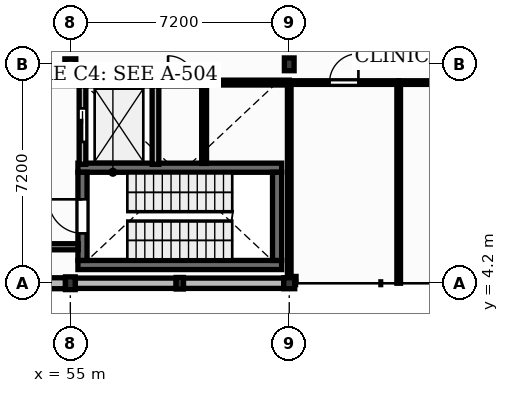
"""IFC4 building model, lengths in metres.
Left out: names, types, materials, properties, quantities, classifications, styles, units other than length and angle.
Written with IfcOpenShell. Run it as: python <this file> out.ifc"""

import sys

from ifc_helpers import new_model, si_unit, direction, frame, frame_2d, origin, origin_2d, place, context, subcontext, project, spatial, rectangle, extrude, element, fill, save


model = new_model("IFC4")
c1 = context("Model", 3, precision=1e-05, world=origin(), true_north=direction((0.0, 1.0)))
c2 = subcontext(c1, "Body", "Model", "MODEL_VIEW")
j1 = project(units=[si_unit("LENGTHUNIT", "METRE"), si_unit("PLANEANGLEUNIT", "RADIAN")], contexts=[c1])
p1 = place(None, origin())
s1 = spatial("IfcSite", under=j1, at=p1, CompositionType="ELEMENT")
p2 = place(p1, origin())
s2 = spatial("IfcBuilding", under=s1, at=p2, CompositionType="ELEMENT")
p3 = place(p2, frame((0.0, 0.0, 4.5)))
s3 = spatial("IfcBuildingStorey", under=s2, at=p3, CompositionType="ELEMENT", Elevation=4.5)
p4 = place(p3, frame((55.0, 4.2, 0.0), z_axis=(0.0, 0.0, 1.0), x_axis=(1.0, 0.0, 0.0)))
e1 = element("IfcColumn", 1, at=p4, inside=s3, PredefinedType="COLUMN", context=c2, shape_type="SweptSolid", body=[
    extrude(rectangle(XDim=0.32, YDim=0.42, at=origin_2d()), origin(), (0.0, 0.0, 1.0), 4.26),
])
for number, where, z_axis, x_axis in (
    (2, (55.0, 11.4, 0.0), (0.0, 0.0, 1.0), (1.0, 0.0, 0.0)),
    (3, (62.2, 4.2, 0.0), (0.0, 0.0, 1.0), (1.0, 0.0, 0.0)),
):
    element("IfcColumn", number, at=place(p3, frame(where, z_axis=z_axis, x_axis=x_axis)), inside=s3, PredefinedType="COLUMN", context=c2, shape_type="SweptSolid", body=[
        extrude(rectangle(XDim=0.36, YDim=0.36, at=origin_2d()), origin(), (0.0, 0.0, 1.0), 4.26),
    ])
p5 = place(p3, frame((62.2, 11.4, 0.0), z_axis=(0.0, 0.0, 1.0), x_axis=(1.0, 0.0, 0.0)))
e4 = element("IfcColumn", 4, at=p5, inside=s3, PredefinedType="COLUMN", context=c2, shape_type="SweptSolid", body=[
    extrude(rectangle(XDim=0.32, YDim=0.42, at=origin_2d()), origin(), (0.0, 0.0, 1.0), 4.26),
])
p6 = place(p3, frame((58.6, 4.2, 0.0), z_axis=(0.0, 0.0, 1.0), x_axis=(1.0, 0.0, 0.0)))
e5 = element("IfcColumn", 5, at=p6, inside=s3, PredefinedType="PILASTER", context=c2, shape_type="SweptSolid", body=[
    extrude(rectangle(XDim=0.24, YDim=0.38, at=origin_2d()), origin(), (0.0, 0.0, 1.0), 4.26),
])
p7 = place(p3, frame((51.52, 4.2, 0.0), z_axis=(0.0, 0.0, 1.0), x_axis=(1.0, 0.0, 0.0)))
e6 = element("IfcWall", 6, at=p7, inside=s3, PredefinedType="SOLIDWALL", context=c2, shape_type="SweptSolid", body=[
    extrude(rectangle(XDim=3.32, YDim=0.36, at=frame_2d((1.66, 0.0))), origin(), (0.0, 0.0, 1.0), 3.8),
])
p8 = place(p7, frame((0.83, 0.0, 1.0)))
e7 = element("IfcOpeningElement", 7, at=p8, cuts=e6, PredefinedType="OPENING", context=c2, shape_type="SweptSolid", body=[
    extrude(rectangle(XDim=1.66, YDim=1.8, at=frame_2d((0.83, 0.9))), frame((0.0, 0.19, 0.0), z_axis=(0.0, -1.0, 0.0), x_axis=(1.0, 0.0, 0.0)), (0.0, 0.0, 1.0), 0.38),
])
p9 = place(p3, frame((55.16, 4.2, 0.0), z_axis=(0.0, 0.0, 1.0), x_axis=(1.0, 0.0, 0.0)))
e8 = element("IfcWall", 8, at=p9, inside=s3, PredefinedType="SOLIDWALL", context=c2, shape_type="SweptSolid", body=[
    extrude(rectangle(XDim=3.32, YDim=0.34, at=frame_2d((1.66, 0.0))), origin(), (0.0, 0.0, 1.0), 3.8),
])
p10 = place(p3, frame((58.72, 4.2, 0.0), z_axis=(0.0, 0.0, 1.0), x_axis=(1.0, 0.0, 0.0)))
e9 = element("IfcWall", 9, at=p10, inside=s3, PredefinedType="SOLIDWALL", context=c2, shape_type="SweptSolid", body=[
    extrude(rectangle(XDim=3.3, YDim=0.34, at=frame_2d((1.65, 0.0))), origin(), (0.0, 0.0, 1.0), 3.8),
])
for number, where, z_axis, x_axis in (
    (10, (55.25, 4.8, 0.0), (0.0, 0.0, 1.0), (1.0, 0.0, 0.0)),
    (11, (55.25, 8.0, 0.0), (0.0, 0.0, 1.0), (1.0, 0.0, 0.0)),
):
    element("IfcWall", number, at=place(p3, frame(where, z_axis=z_axis, x_axis=x_axis)), inside=s3, PredefinedType="SHEAR", context=c2, shape_type="SweptSolid", body=[
        extrude(rectangle(XDim=6.7, YDim=0.3, at=frame_2d((3.35, 0.0))), origin(), (0.0, 0.0, 1.0), 4.25),
    ])
p11 = place(p3, frame((55.4, 4.95, 0.0), z_axis=(0.0, 0.0, 1.0), x_axis=(0.0, 1.0, 0.0)))
e12 = element("IfcWall", 12, at=p11, inside=s3, PredefinedType="SHEAR", context=c2, shape_type="SweptSolid", body=[
    extrude(rectangle(XDim=2.9, YDim=0.3, at=frame_2d((1.45, 0.0))), origin(), (0.0, 0.0, 1.0), 4.25),
])
p12 = place(p11, frame((0.89, 0.0, 0.0)))
e13 = element("IfcOpeningElement", 13, at=p12, cuts=e12, PredefinedType="OPENING", context=c2, shape_type="SweptSolid", body=[
    extrude(rectangle(XDim=1.12, YDim=2.1, at=frame_2d((0.56, 1.05))), frame((0.0, 0.16, 0.0), z_axis=(0.0, -1.0, 0.0), x_axis=(1.0, 0.0, 0.0)), (0.0, 0.0, 1.0), 0.32),
])
p13 = place(p3, frame((61.8, 4.95, 0.0), z_axis=(0.0, 0.0, 1.0), x_axis=(0.0, 1.0, 0.0)))
e14 = element("IfcWall", 14, at=p13, inside=s3, PredefinedType="SHEAR", context=c2, shape_type="SweptSolid", body=[
    extrude(rectangle(XDim=2.9, YDim=0.3, at=frame_2d((1.45, 0.0))), origin(), (0.0, 0.0, 1.0), 4.25),
])
p14 = place(p3, frame((55.4, 10.8, 0.0), z_axis=(0.0, 0.0, 1.0), x_axis=(1.0, 0.0, 0.0)))
e15 = element("IfcWall", 15, at=p14, inside=s3, PredefinedType="SOLIDWALL", context=c2, shape_type="SweptSolid", body=[
    extrude(rectangle(XDim=2.4, YDim=0.22, at=frame_2d((1.2, 0.0))), origin(), (0.0, 0.0, 1.0), 4.25),
])
p15 = place(p3, frame((55.4, 8.11, 0.0), z_axis=(0.0, 0.0, 1.0), x_axis=(0.0, 1.0, 0.0)))
e16 = element("IfcWall", 16, at=p15, inside=s3, PredefinedType="SOLIDWALL", context=c2, shape_type="SweptSolid", body=[
    extrude(rectangle(XDim=2.58, YDim=0.22, at=frame_2d((1.29, 0.0))), origin(), (0.0, 0.0, 1.0), 4.25),
])
p16 = place(p15, frame((0.74, 0.0, 0.0)))
e17 = element("IfcOpeningElement", 17, at=p16, cuts=e16, PredefinedType="OPENING", context=c2, shape_type="SweptSolid", body=[
    extrude(rectangle(XDim=1.1, YDim=2.15, at=frame_2d((0.55, 1.075))), frame((0.0, 0.12, 0.0), z_axis=(0.0, -1.0, 0.0), x_axis=(1.0, 0.0, 0.0)), (0.0, 0.0, 1.0), 0.24),
])
p17 = place(p3, frame((57.8, 8.11, 0.0), z_axis=(0.0, 0.0, 1.0), x_axis=(0.0, 1.0, 0.0)))
e18 = element("IfcWall", 18, at=p17, inside=s3, PredefinedType="SOLIDWALL", context=c2, shape_type="SweptSolid", body=[
    extrude(rectangle(XDim=2.58, YDim=0.22, at=frame_2d((1.29, 0.0))), origin(), (0.0, 0.0, 1.0), 4.25),
])
p18 = place(p3, frame((51.0, 10.8, 0.0), z_axis=(0.0, 0.0, 1.0), x_axis=(1.0, 0.0, 0.0)))
e19 = element("IfcWall", 19, at=p18, inside=s3, PredefinedType="PARTITIONING", context=c2, shape_type="SweptSolid", body=[
    extrude(rectangle(XDim=4.29, YDim=0.2, at=frame_2d((2.145, 0.0))), origin(), (0.0, 0.0, 1.0), 4.18),
])
p19 = place(p18, frame((1.405, 0.0, 0.0)))
e20 = element("IfcOpeningElement", 20, at=p19, cuts=e19, PredefinedType="OPENING", context=c2, shape_type="SweptSolid", body=[
    extrude(rectangle(XDim=1.48, YDim=2.25, at=frame_2d((0.74, 1.125))), frame((0.0, 0.11, 0.0), z_axis=(0.0, -1.0, 0.0), x_axis=(1.0, 0.0, 0.0)), (0.0, 0.0, 1.0), 0.22),
])
p20 = place(p3, frame((57.91, 10.8, 0.0), z_axis=(0.0, 0.0, 1.0), x_axis=(1.0, 0.0, 0.0)))
e21 = element("IfcWall", 21, at=p20, inside=s3, PredefinedType="SOLIDWALL", context=c2, shape_type="SweptSolid", body=[
    extrude(rectangle(XDim=1.49, YDim=0.22, at=frame_2d((0.745, 0.0))), origin(), (0.0, 0.0, 1.0), 4.18),
])
p21 = place(p20, frame((0.305, 0.0, 0.0)))
e22 = element("IfcOpeningElement", 22, at=p21, cuts=e21, PredefinedType="OPENING", context=c2, shape_type="SweptSolid", body=[
    extrude(rectangle(XDim=0.88, YDim=2.05, at=frame_2d((0.44, 1.025))), frame((0.0, 0.12, 0.0), z_axis=(0.0, -1.0, 0.0), x_axis=(1.0, 0.0, 0.0)), (0.0, 0.0, 1.0), 0.24),
])
p22 = place(p3, frame((62.2, 10.8, 0.0), z_axis=(0.0, 0.0, 1.0), x_axis=(1.0, 0.0, 0.0)))
e23 = element("IfcWall", 23, at=p22, inside=s3, PredefinedType="PLUMBINGWALL", context=c2, shape_type="SweptSolid", body=[
    extrude(rectangle(XDim=3.6, YDim=0.12, at=frame_2d((1.8, 0.0))), origin(), (0.0, 0.0, 1.0), 4.18),
])
p23 = place(p22, frame((1.325, 0.0, 0.0)))
e24 = element("IfcOpeningElement", 24, at=p23, cuts=e23, PredefinedType="OPENING", context=c2, shape_type="SweptSolid", body=[
    extrude(rectangle(XDim=0.95, YDim=2.1, at=frame_2d((0.475, 1.05))), frame((0.0, 0.07, 0.0), z_axis=(0.0, -1.0, 0.0), x_axis=(1.0, 0.0, 0.0)), (0.0, 0.0, 1.0), 0.14),
])
p24 = place(p3, frame((65.8, 4.2, 0.0), z_axis=(0.0, 0.0, 1.0), x_axis=(0.0, 1.0, 0.0)))
e25 = element("IfcWall", 25, at=p24, inside=s3, PredefinedType="PLUMBINGWALL", context=c2, shape_type="SweptSolid", body=[
    extrude(rectangle(XDim=6.53, YDim=0.12, at=frame_2d((3.265, 0.0))), origin(), (0.0, 0.0, 1.0), 4.18),
])
p25 = place(p3, frame((65.8, 10.8, 0.0), z_axis=(0.0, 0.0, 1.0), x_axis=(1.0, 0.0, 0.0)))
e26 = element("IfcWall", 26, at=p25, inside=s3, PredefinedType="PLUMBINGWALL", context=c2, shape_type="SweptSolid", body=[
    extrude(rectangle(XDim=5.995, YDim=0.12, at=frame_2d((2.998, 0.0))), origin(), (0.0, 0.0, 1.0), 4.18),
])
p26 = place(p25, frame((2.522, 0.0, 0.0)))
e27 = element("IfcOpeningElement", 27, at=p26, cuts=e26, PredefinedType="OPENING", context=c2, shape_type="SweptSolid", body=[
    extrude(rectangle(XDim=0.95, YDim=2.1, at=frame_2d((0.475, 1.05))), frame((0.0, 0.07, 0.0), z_axis=(0.0, -1.0, 0.0), x_axis=(1.0, 0.0, 0.0)), (0.0, 0.0, 1.0), 0.14),
])
p27 = place(p3, frame((59.4, 8.14, 0.0), z_axis=(0.0, 0.0, 1.0), x_axis=(0.0, 1.0, 0.0)))
e28 = element("IfcWall", 28, at=p27, inside=s3, PredefinedType="PARTITIONING", context=c2, shape_type="SweptSolid", body=[
    extrude(rectangle(XDim=2.59, YDim=0.16, at=frame_2d((1.295, 0.0))), origin(), (0.0, 0.0, 1.0), 4.18),
])
p28 = place(p3, frame((51.0, 5.4, 0.0), z_axis=(0.0, 0.0, 1.0), x_axis=(1.0, 0.0, 0.0)))
e29 = element("IfcWall", 29, at=p28, inside=s3, PredefinedType="PARTITIONING", context=c2, shape_type="SweptSolid", body=[
    extrude(rectangle(XDim=4.26, YDim=0.2, at=frame_2d((2.13, 0.0))), origin(), (0.0, 0.0, 1.0), 4.18),
])
p29 = place(p3, frame((59.4, 10.8, 0.0), z_axis=(0.0, 0.0, 1.0), x_axis=(1.0, 0.0, 0.0)))
e30 = element("IfcWall", 30, at=p29, inside=s3, PredefinedType="PARTITIONING", context=c2, shape_type="SweptSolid", body=[
    extrude(rectangle(XDim=2.8, YDim=0.16, at=frame_2d((1.4, 0.0))), origin(), (0.0, 0.0, 1.0), 4.18),
])
p30 = place(p3, frame((62.2, 4.38, 0.0), z_axis=(0.0, 0.0, 1.0), x_axis=(0.0, 1.0, 0.0)))
e31 = element("IfcWall", 31, at=p30, inside=s3, PredefinedType="PLUMBINGWALL", context=c2, shape_type="SweptSolid", body=[
    extrude(rectangle(XDim=6.35, YDim=0.12, at=frame_2d((3.175, 0.0))), origin(), (0.0, 0.0, 1.0), 3.74),
])
p31 = place(p16, origin())
e32 = element("IfcDoor", 32, at=p31, inside=s3, OperationType="SLIDING_TO_LEFT", PredefinedType="DOOR", context=c2, shape_type="SweptSolid", body=[
    extrude(rectangle(XDim=1.1, YDim=2.15, at=frame_2d((0.55, 1.075))), frame((0.0, 0.025, 0.0), z_axis=(0.0, -1.0, 0.0), x_axis=(1.0, 0.0, 0.0)), (0.0, 0.0, 1.0), 0.05),
])
fill(e17, e32)
p32 = place(p12, origin())
e33 = element("IfcDoor", 33, at=p32, inside=s3, OperationType="SINGLE_SWING_RIGHT", PredefinedType="DOOR", context=c2, shape_type="SweptSolid", body=[
    extrude(rectangle(XDim=1.12, YDim=2.1, at=frame_2d((0.56, 1.05))), frame((0.0, 0.025, 0.0), z_axis=(0.0, -1.0, 0.0), x_axis=(1.0, 0.0, 0.0)), (0.0, 0.0, 1.0), 0.05),
])
fill(e13, e33)
p33 = place(p21, origin())
e34 = element("IfcDoor", 34, at=p33, inside=s3, OperationType="SINGLE_SWING_LEFT", PredefinedType="DOOR", context=c2, shape_type="SweptSolid", body=[
    extrude(rectangle(XDim=0.88, YDim=2.05, at=frame_2d((0.44, 1.025))), frame((0.0, 0.025, 0.0), z_axis=(0.0, -1.0, 0.0), x_axis=(1.0, 0.0, 0.0)), (0.0, 0.0, 1.0), 0.05),
])
fill(e22, e34)
p34 = place(p23, origin())
e35 = element("IfcDoor", 35, at=p34, inside=s3, OperationType="SINGLE_SWING_RIGHT", PredefinedType="DOOR", context=c2, shape_type="SweptSolid", body=[
    extrude(rectangle(XDim=0.95, YDim=2.1, at=frame_2d((0.475, 1.05))), frame((0.0, 0.025, 0.0), z_axis=(0.0, -1.0, 0.0), x_axis=(1.0, 0.0, 0.0)), (0.0, 0.0, 1.0), 0.05),
])
fill(e24, e35)
save(model, sys.argv[1])
